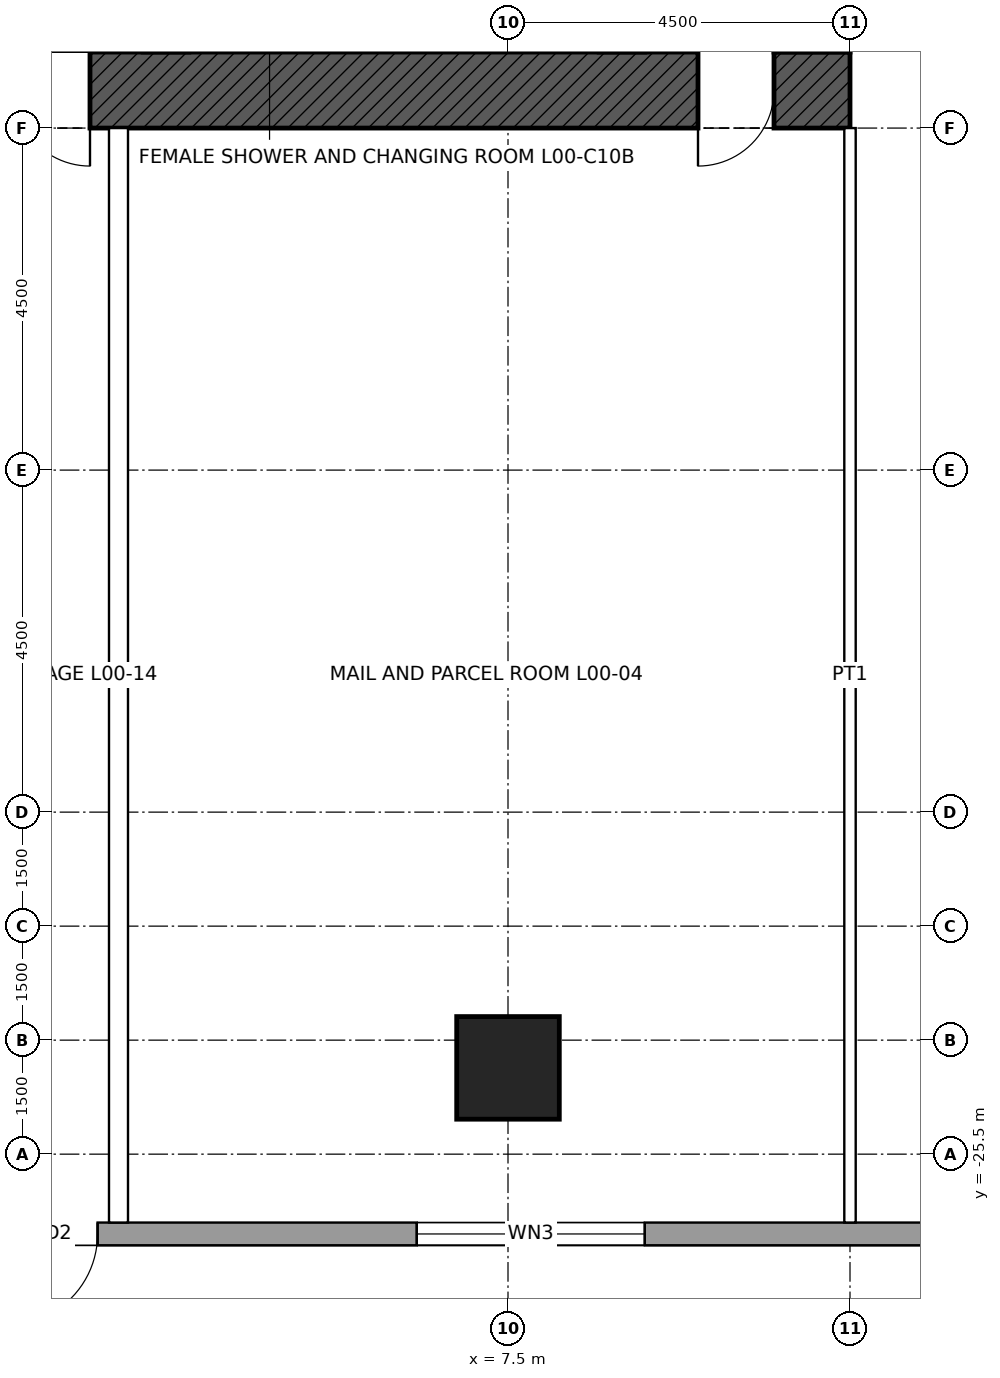
"""IFC4 building model, lengths in metres.
Left out: names, types, materials, properties, quantities, classifications, styles, units other than length and angle.
Written with IfcOpenShell. Run it as: python <this file> out.ifc"""

import sys

from ifc_helpers import new_model, si_unit, direction, frame, frame_2d, origin, origin_2d, place, context, subcontext, project, spatial, rectangle, hollow_rectangle, extrude, element, fill, save


model = new_model("IFC4")
c1 = context("Model", 3, precision=1e-05, world=origin(), true_north=direction((0.0, 1.0)))
c2 = subcontext(c1, "Body", "Model", "MODEL_VIEW")
j1 = project(units=[si_unit("LENGTHUNIT", "METRE"), si_unit("PLANEANGLEUNIT", "RADIAN")], contexts=[c1])
p1 = place(None, origin())
s1 = spatial("IfcSite", under=j1, at=p1, CompositionType="ELEMENT")
p2 = place(p1, origin())
s2 = spatial("IfcBuilding", under=s1, at=p2, CompositionType="ELEMENT")
p3 = place(p2, origin())
s3 = spatial("IfcBuildingStorey", under=s2, at=p3, CompositionType="ELEMENT", Elevation=0.0)
p4 = place(p3, frame((7.5, -24.365, -0.3), z_axis=(0.0, 0.0, 1.0), x_axis=(1.0, 0.0, 0.0)))
e1 = element("IfcColumn", 1, at=p4, inside=s3, PredefinedType="COLUMN", context=c2, shape_type="SweptSolid", body=[
    extrude(hollow_rectangle(XDim=1.35, YDim=1.35, WallThickness=0.1, at=origin_2d()), origin(), (0.0, 0.0, 1.0), 7.5),
])
p5 = place(p3, frame((12.0, -11.5, -0.3), z_axis=(0.0, 0.0, 1.0), x_axis=(-1.0, 0.0, 0.0)))
e2 = element("IfcWall", 2, at=p5, inside=s3, PredefinedType="SHEAR", context=c2, shape_type="SweptSolid", body=[
    extrude(rectangle(XDim=24.0, YDim=1.0, at=frame_2d((12.0, 0.0))), origin(), (0.0, 0.0, 1.0), 7.5),
])
p6 = place(p5, frame((10.0, 0.0, 0.3)))
e3 = element("IfcOpeningElement", 3, at=p6, cuts=e2, PredefinedType="OPENING", context=c2, shape_type="SweptSolid", body=[
    extrude(rectangle(XDim=1.0, YDim=2.1, at=frame_2d((0.5, 1.05))), frame((0.0, 0.51, 0.0), z_axis=(0.0, -1.0, 0.0), x_axis=(1.0, 0.0, 0.0)), (0.0, 0.0, 1.0), 1.02),
])
p7 = place(p5, frame((1.0, 0.0, 0.3)))
e4 = element("IfcOpeningElement", 4, at=p7, cuts=e2, PredefinedType="OPENING", context=c2, shape_type="SweptSolid", body=[
    extrude(rectangle(XDim=1.0, YDim=2.4, at=frame_2d((0.5, 1.2))), frame((0.0, 0.51, 0.0), z_axis=(0.0, -1.0, 0.0), x_axis=(1.0, 0.0, 0.0)), (0.0, 0.0, 1.0), 1.02),
])
p8 = place(p3, frame((-24.1, -26.55, 0.0), z_axis=(0.0, 0.0, 1.0), x_axis=(1.0, 0.0, 0.0)))
e5 = element("IfcWall", 5, at=p8, inside=s3, PredefinedType="SOLIDWALL", context=c2, shape_type="SweptSolid", body=[
    extrude(rectangle(XDim=48.2, YDim=0.3, at=frame_2d((24.1, 0.0))), origin(), (0.0, 0.0, 1.0), 6.95),
])
p9 = place(p8, frame((15.5, 0.0, 0.0)))
e6 = element("IfcOpeningElement", 6, at=p9, cuts=e5, PredefinedType="OPENING", context=c2, shape_type="SweptSolid", body=[
    extrude(rectangle(XDim=1.2, YDim=2.4, at=frame_2d((0.6, 1.2))), frame((0.0, 0.16, 0.0), z_axis=(0.0, -1.0, 0.0), x_axis=(1.0, 0.0, 0.0)), (0.0, 0.0, 1.0), 0.32),
])
p10 = place(p8, frame((22.0, 0.0, 0.0)))
e7 = element("IfcOpeningElement", 7, at=p10, cuts=e5, PredefinedType="OPENING", context=c2, shape_type="SweptSolid", body=[
    extrude(rectangle(XDim=1.2, YDim=2.4, at=frame_2d((0.6, 1.2))), frame((0.0, 0.16, 0.0), z_axis=(0.0, -1.0, 0.0), x_axis=(1.0, 0.0, 0.0)), (0.0, 0.0, 1.0), 0.32),
])
p11 = place(p8, frame((25.0, 0.0, 0.0)))
e8 = element("IfcOpeningElement", 8, at=p11, cuts=e5, PredefinedType="OPENING", context=c2, shape_type="SweptSolid", body=[
    extrude(rectangle(XDim=1.2, YDim=2.4, at=frame_2d((0.6, 1.2))), frame((0.0, 0.16, 0.0), z_axis=(0.0, -1.0, 0.0), x_axis=(1.0, 0.0, 0.0)), (0.0, 0.0, 1.0), 0.32),
])
p12 = place(p8, frame((2.4, 0.0, 0.6)))
e9 = element("IfcOpeningElement", 9, at=p12, cuts=e5, PredefinedType="OPENING", context=c2, shape_type="SweptSolid", body=[
    extrude(rectangle(XDim=3.0, YDim=4.5, at=frame_2d((1.5, 2.25))), frame((0.0, 0.16, 0.0), z_axis=(0.0, -1.0, 0.0), x_axis=(1.0, 0.0, 0.0)), (0.0, 0.0, 1.0), 0.32),
])
p13 = place(p8, frame((6.4, 0.0, 0.6)))
e10 = element("IfcOpeningElement", 10, at=p13, cuts=e5, PredefinedType="OPENING", context=c2, shape_type="SweptSolid", body=[
    extrude(rectangle(XDim=3.0, YDim=4.5, at=frame_2d((1.5, 2.25))), frame((0.0, 0.16, 0.0), z_axis=(0.0, -1.0, 0.0), x_axis=(1.0, 0.0, 0.0)), (0.0, 0.0, 1.0), 0.32),
])
p14 = place(p8, frame((30.4, 0.0, 0.6)))
e11 = element("IfcOpeningElement", 11, at=p14, cuts=e5, PredefinedType="OPENING", context=c2, shape_type="SweptSolid", body=[
    extrude(rectangle(XDim=3.0, YDim=4.5, at=frame_2d((1.5, 2.25))), frame((0.0, 0.16, 0.0), z_axis=(0.0, -1.0, 0.0), x_axis=(1.0, 0.0, 0.0)), (0.0, 0.0, 1.0), 0.32),
])
p15 = place(p8, frame((38.4, 0.0, 0.6)))
e12 = element("IfcOpeningElement", 12, at=p15, cuts=e5, PredefinedType="OPENING", context=c2, shape_type="SweptSolid", body=[
    extrude(rectangle(XDim=3.0, YDim=4.5, at=frame_2d((1.5, 2.25))), frame((0.0, 0.16, 0.0), z_axis=(0.0, -1.0, 0.0), x_axis=(1.0, 0.0, 0.0)), (0.0, 0.0, 1.0), 0.32),
])
p16 = place(p8, frame((42.4, 0.0, 0.6)))
e13 = element("IfcOpeningElement", 13, at=p16, cuts=e5, PredefinedType="OPENING", context=c2, shape_type="SweptSolid", body=[
    extrude(rectangle(XDim=3.0, YDim=4.5, at=frame_2d((1.5, 2.25))), frame((0.0, 0.16, 0.0), z_axis=(0.0, -1.0, 0.0), x_axis=(1.0, 0.0, 0.0)), (0.0, 0.0, 1.0), 0.32),
])
p17 = place(p3, frame((12.0, -12.0, 0.0), z_axis=(0.0, 0.0, 1.0), x_axis=(0.0, -1.0, 0.0)))
e14 = element("IfcWall", 14, at=p17, inside=s3, PredefinedType="PARTITIONING", context=c2, shape_type="SweptSolid", body=[
    extrude(rectangle(XDim=14.4, YDim=0.15, at=frame_2d((7.2, 0.0))), origin(), (0.0, 0.0, 1.0), 5.909),
])
p18 = place(p3, frame((2.375, -12.0, 0.0), z_axis=(0.0, 0.0, 1.0), x_axis=(0.0, -1.0, 0.0)))
e15 = element("IfcWall", 15, at=p18, inside=s3, PredefinedType="SOLIDWALL", context=c2, shape_type="SweptSolid", body=[
    extrude(rectangle(XDim=14.4, YDim=0.25, at=frame_2d((7.2, 0.0))), origin(), (0.0, 0.0, 1.0), 6.95),
])
p19 = place(p11, frame((1.2, 0.0, 0.0), z_axis=(0.0, 0.0, 1.0), x_axis=(-1.0, 0.0, 0.0)))
e16 = element("IfcDoor", 16, at=p19, inside=s3, OperationType="SINGLE_SWING_RIGHT", PredefinedType="DOOR", context=c2, shape_type="SweptSolid", body=[
    extrude(rectangle(XDim=1.2, YDim=2.4, at=frame_2d((0.6, 1.2))), frame((0.0, 0.025, 0.0), z_axis=(0.0, -1.0, 0.0), x_axis=(1.0, 0.0, 0.0)), (0.0, 0.0, 1.0), 0.05),
])
fill(e8, e16)
p20 = place(p14, origin())
e17 = element("IfcWindow", 17, at=p20, inside=s3, PartitioningType="SINGLE_PANEL", PredefinedType="WINDOW", context=c2, shape_type="SweptSolid", body=[
    extrude(rectangle(XDim=3.0, YDim=4.5, at=frame_2d((1.5, 2.25))), frame((0.0, 0.03, 0.0), z_axis=(0.0, -1.0, 0.0), x_axis=(1.0, 0.0, 0.0)), (0.0, 0.0, 1.0), 0.06),
])
fill(e11, e17)
p21 = place(p6, origin())
e18 = element("IfcDoor", 18, at=p21, inside=s3, OperationType="SINGLE_SWING_LEFT", PredefinedType="DOOR", context=c2, shape_type="SweptSolid", body=[
    extrude(rectangle(XDim=1.0, YDim=2.1, at=frame_2d((0.5, 1.05))), frame((0.0, 0.025, 0.0), z_axis=(0.0, -1.0, 0.0), x_axis=(1.0, 0.0, 0.0)), (0.0, 0.0, 1.0), 0.05),
])
fill(e3, e18)
p22 = place(p7, origin())
e19 = element("IfcDoor", 19, at=p22, inside=s3, OperationType="SINGLE_SWING_RIGHT", PredefinedType="DOOR", context=c2, shape_type="SweptSolid", body=[
    extrude(rectangle(XDim=1.0, YDim=2.4, at=frame_2d((0.5, 1.2))), frame((0.0, 0.025, 0.0), z_axis=(0.0, -1.0, 0.0), x_axis=(1.0, 0.0, 0.0)), (0.0, 0.0, 1.0), 0.05),
])
fill(e4, e19)
save(model, sys.argv[1])
